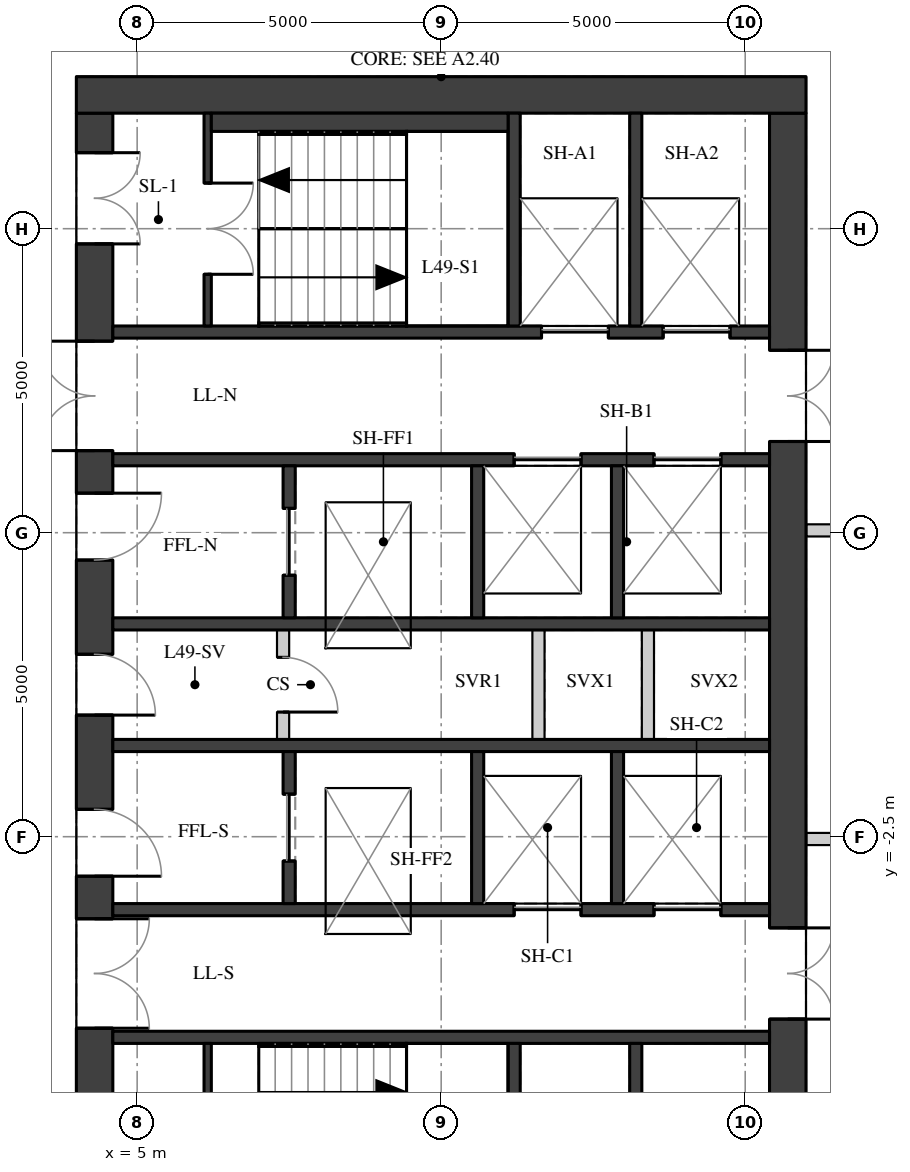
"""IFC4 building model, lengths in metres.
Left out: names, types, materials, properties, quantities, classifications, styles, units other than length and angle.
Written with IfcOpenShell. Run it as: python <this file> out.ifc"""

import sys

from ifc_helpers import new_model, si_unit, direction, frame, frame_2d, origin, place, context, subcontext, project, spatial, rectangle, extrude, element, fill, save


model = new_model("IFC4")
c1 = context("Model", 3, precision=1e-05, world=origin(), true_north=direction((0.0, 1.0)))
c2 = subcontext(c1, "Body", "Model", "MODEL_VIEW")
j1 = project(units=[si_unit("LENGTHUNIT", "METRE"), si_unit("PLANEANGLEUNIT", "RADIAN")], contexts=[c1])
p1 = place(None, origin())
s1 = spatial("IfcSite", under=j1, at=p1, CompositionType="ELEMENT")
p2 = place(p1, origin())
s2 = spatial("IfcBuilding", under=s1, at=p2, CompositionType="ELEMENT")
p3 = place(p2, frame((0.0, 0.0, 174.8)))
s3 = spatial("IfcBuildingStorey", under=s2, at=p3, CompositionType="ELEMENT", Elevation=174.8)
p4 = place(p3, frame((4.3, -9.4, 0.0), z_axis=(0.0, 0.0, 1.0), x_axis=(0.0, 1.0, 0.0)))
e1 = element("IfcWall", 1, at=p4, inside=s3, PredefinedType="SHEAR", context=c2, shape_type="SweptSolid", body=[
    extrude(rectangle(XDim=18.8, YDim=0.6, at=frame_2d((9.4, 0.0))), origin(), (0.0, 0.0, 1.0), 3.02),
])
p5 = place(p4, frame((0.65, 0.0, 0.0)))
e2 = element("IfcOpeningElement", 2, at=p5, cuts=e1, PredefinedType="OPENING", context=c2, shape_type="SweptSolid", body=[
    extrude(rectangle(XDim=1.5, YDim=2.1, at=frame_2d((0.75, 1.05))), frame((0.0, 0.31, 0.0), z_axis=(0.0, -1.0, 0.0), x_axis=(1.0, 0.0, 0.0)), (0.0, 0.0, 1.0), 0.62),
])
p6 = place(p4, frame((3.75, 0.0, 0.0)))
e3 = element("IfcOpeningElement", 3, at=p6, cuts=e1, PredefinedType="OPENING", context=c2, shape_type="SweptSolid", body=[
    extrude(rectangle(XDim=1.8, YDim=2.1, at=frame_2d((0.9, 1.05))), frame((0.0, 0.31, 0.0), z_axis=(0.0, -1.0, 0.0), x_axis=(1.0, 0.0, 0.0)), (0.0, 0.0, 1.0), 0.62),
])
p7 = place(p4, frame((6.25, 0.0, 0.0)))
e4 = element("IfcOpeningElement", 4, at=p7, cuts=e1, PredefinedType="OPENING", context=c2, shape_type="SweptSolid", body=[
    extrude(rectangle(XDim=1.1, YDim=2.1, at=frame_2d((0.55, 1.05))), frame((0.0, 0.31, 0.0), z_axis=(0.0, -1.0, 0.0), x_axis=(1.0, 0.0, 0.0)), (0.0, 0.0, 1.0), 0.62),
])
p8 = place(p4, frame((8.9, 0.0, 0.0)))
e5 = element("IfcOpeningElement", 5, at=p8, cuts=e1, PredefinedType="OPENING", context=c2, shape_type="SweptSolid", body=[
    extrude(rectangle(XDim=1.0, YDim=2.1, at=frame_2d((0.5, 1.05))), frame((0.0, 0.31, 0.0), z_axis=(0.0, -1.0, 0.0), x_axis=(1.0, 0.0, 0.0)), (0.0, 0.0, 1.0), 0.62),
])
p9 = place(p4, frame((11.45, 0.0, 0.0)))
e6 = element("IfcOpeningElement", 6, at=p9, cuts=e1, PredefinedType="OPENING", context=c2, shape_type="SweptSolid", body=[
    extrude(rectangle(XDim=1.1, YDim=2.1, at=frame_2d((0.55, 1.05))), frame((0.0, 0.31, 0.0), z_axis=(0.0, -1.0, 0.0), x_axis=(1.0, 0.0, 0.0)), (0.0, 0.0, 1.0), 0.62),
])
p10 = place(p4, frame((13.25, 0.0, 0.0)))
e7 = element("IfcOpeningElement", 7, at=p10, cuts=e1, PredefinedType="OPENING", context=c2, shape_type="SweptSolid", body=[
    extrude(rectangle(XDim=1.8, YDim=2.1, at=frame_2d((0.9, 1.05))), frame((0.0, 0.31, 0.0), z_axis=(0.0, -1.0, 0.0), x_axis=(1.0, 0.0, 0.0)), (0.0, 0.0, 1.0), 0.62),
])
p11 = place(p4, frame((16.65, 0.0, 0.0)))
e8 = element("IfcOpeningElement", 8, at=p11, cuts=e1, PredefinedType="OPENING", context=c2, shape_type="SweptSolid", body=[
    extrude(rectangle(XDim=1.5, YDim=2.1, at=frame_2d((0.75, 1.05))), frame((0.0, 0.31, 0.0), z_axis=(0.0, -1.0, 0.0), x_axis=(1.0, 0.0, 0.0)), (0.0, 0.0, 1.0), 0.62),
])
p12 = place(p3, frame((15.7, -9.4, 0.0), z_axis=(0.0, 0.0, 1.0), x_axis=(0.0, 1.0, 0.0)))
e9 = element("IfcWall", 9, at=p12, inside=s3, PredefinedType="SHEAR", context=c2, shape_type="SweptSolid", body=[
    extrude(rectangle(XDim=18.8, YDim=0.6, at=frame_2d((9.4, 0.0))), origin(), (0.0, 0.0, 1.0), 3.02),
])
p13 = place(p12, frame((13.4, 0.0, 0.0)))
e10 = element("IfcOpeningElement", 10, at=p13, cuts=e9, PredefinedType="OPENING", context=c2, shape_type="SweptSolid", body=[
    extrude(rectangle(XDim=1.5, YDim=2.1, at=frame_2d((0.75, 1.05))), frame((0.0, 0.31, 0.0), z_axis=(0.0, -1.0, 0.0), x_axis=(1.0, 0.0, 0.0)), (0.0, 0.0, 1.0), 0.62),
])
p14 = place(p12, frame((3.9, 0.0, 0.0)))
e11 = element("IfcOpeningElement", 11, at=p14, cuts=e9, PredefinedType="OPENING", context=c2, shape_type="SweptSolid", body=[
    extrude(rectangle(XDim=1.5, YDim=2.1, at=frame_2d((0.75, 1.05))), frame((0.0, 0.31, 0.0), z_axis=(0.0, -1.0, 0.0), x_axis=(1.0, 0.0, 0.0)), (0.0, 0.0, 1.0), 0.62),
])
p15 = place(p3, frame((4.0, 9.7, 0.0), z_axis=(0.0, 0.0, 1.0), x_axis=(1.0, 0.0, 0.0)))
e12 = element("IfcWall", 12, at=p15, inside=s3, PredefinedType="SHEAR", context=c2, shape_type="SweptSolid", body=[
    extrude(rectangle(XDim=12.0, YDim=0.6, at=frame_2d((6.0, 0.0))), origin(), (0.0, 0.0, 1.0), 3.02),
])
p16 = place(p3, frame((4.6, 5.8, 0.0), z_axis=(0.0, 0.0, 1.0), x_axis=(1.0, 0.0, 0.0)))
e13 = element("IfcWall", 13, at=p16, inside=s3, PredefinedType="SHEAR", context=c2, shape_type="SweptSolid", body=[
    extrude(rectangle(XDim=10.8, YDim=0.2, at=frame_2d((5.4, 0.0))), origin(), (0.0, 0.0, 1.0), 3.02),
])
p17 = place(p16, frame((7.05, 0.0, 0.0)))
e14 = element("IfcOpeningElement", 14, at=p17, cuts=e13, PredefinedType="OPENING", context=c2, shape_type="SweptSolid", body=[
    extrude(rectangle(XDim=1.1, YDim=2.1, at=frame_2d((0.55, 1.05))), frame((0.0, 0.11, 0.0), z_axis=(0.0, -1.0, 0.0), x_axis=(1.0, 0.0, 0.0)), (0.0, 0.0, 1.0), 0.22),
])
p18 = place(p16, frame((9.05, 0.0, 0.0)))
e15 = element("IfcOpeningElement", 15, at=p18, cuts=e13, PredefinedType="OPENING", context=c2, shape_type="SweptSolid", body=[
    extrude(rectangle(XDim=1.1, YDim=2.1, at=frame_2d((0.55, 1.05))), frame((0.0, 0.11, 0.0), z_axis=(0.0, -1.0, 0.0), x_axis=(1.0, 0.0, 0.0)), (0.0, 0.0, 1.0), 0.22),
])
p19 = place(p3, frame((4.6, 3.7, 0.0), z_axis=(0.0, 0.0, 1.0), x_axis=(1.0, 0.0, 0.0)))
e16 = element("IfcWall", 16, at=p19, inside=s3, PredefinedType="SHEAR", context=c2, shape_type="SweptSolid", body=[
    extrude(rectangle(XDim=10.8, YDim=0.2, at=frame_2d((5.4, 0.0))), origin(), (0.0, 0.0, 1.0), 3.02),
])
p20 = place(p19, frame((6.6, 0.0, 0.0)))
e17 = element("IfcOpeningElement", 17, at=p20, cuts=e16, PredefinedType="OPENING", context=c2, shape_type="SweptSolid", body=[
    extrude(rectangle(XDim=1.1, YDim=2.1, at=frame_2d((0.55, 1.05))), frame((0.0, 0.11, 0.0), z_axis=(0.0, -1.0, 0.0), x_axis=(1.0, 0.0, 0.0)), (0.0, 0.0, 1.0), 0.22),
])
p21 = place(p19, frame((8.9, 0.0, 0.0)))
e18 = element("IfcOpeningElement", 18, at=p21, cuts=e16, PredefinedType="OPENING", context=c2, shape_type="SweptSolid", body=[
    extrude(rectangle(XDim=1.1, YDim=2.1, at=frame_2d((0.55, 1.05))), frame((0.0, 0.11, 0.0), z_axis=(0.0, -1.0, 0.0), x_axis=(1.0, 0.0, 0.0)), (0.0, 0.0, 1.0), 0.22),
])
for number, where, z_axis, x_axis in (
    (19, (4.6, 1.0, 0.0), (0.0, 0.0, 1.0), (1.0, 0.0, 0.0)),
    (20, (4.6, -1.0, 0.0), (0.0, 0.0, 1.0), (1.0, 0.0, 0.0)),
):
    element("IfcWall", number, at=place(p3, frame(where, z_axis=z_axis, x_axis=x_axis)), inside=s3, PredefinedType="SHEAR", context=c2, shape_type="SweptSolid", body=[
        extrude(rectangle(XDim=10.8, YDim=0.2, at=frame_2d((5.4, 0.0))), origin(), (0.0, 0.0, 1.0), 3.02),
    ])
p22 = place(p3, frame((4.6, -3.7, 0.0), z_axis=(0.0, 0.0, 1.0), x_axis=(1.0, 0.0, 0.0)))
e21 = element("IfcWall", 21, at=p22, inside=s3, PredefinedType="SHEAR", context=c2, shape_type="SweptSolid", body=[
    extrude(rectangle(XDim=10.8, YDim=0.2, at=frame_2d((5.4, 0.0))), origin(), (0.0, 0.0, 1.0), 3.02),
])
p23 = place(p22, frame((6.6, 0.0, 0.0)))
e22 = element("IfcOpeningElement", 22, at=p23, cuts=e21, PredefinedType="OPENING", context=c2, shape_type="SweptSolid", body=[
    extrude(rectangle(XDim=1.1, YDim=2.1, at=frame_2d((0.55, 1.05))), frame((0.0, 0.11, 0.0), z_axis=(0.0, -1.0, 0.0), x_axis=(1.0, 0.0, 0.0)), (0.0, 0.0, 1.0), 0.22),
])
p24 = place(p22, frame((8.9, 0.0, 0.0)))
e23 = element("IfcOpeningElement", 23, at=p24, cuts=e21, PredefinedType="OPENING", context=c2, shape_type="SweptSolid", body=[
    extrude(rectangle(XDim=1.1, YDim=2.1, at=frame_2d((0.55, 1.05))), frame((0.0, 0.11, 0.0), z_axis=(0.0, -1.0, 0.0), x_axis=(1.0, 0.0, 0.0)), (0.0, 0.0, 1.0), 0.22),
])
p25 = place(p3, frame((4.6, -5.8, 0.0), z_axis=(0.0, 0.0, 1.0), x_axis=(1.0, 0.0, 0.0)))
e24 = element("IfcWall", 24, at=p25, inside=s3, PredefinedType="SHEAR", context=c2, shape_type="SweptSolid", body=[
    extrude(rectangle(XDim=10.8, YDim=0.2, at=frame_2d((5.4, 0.0))), origin(), (0.0, 0.0, 1.0), 3.02),
])
for number, where, z_axis, x_axis in (
    (25, (11.2, 5.9, 0.0), (0.0, 0.0, 1.0), (0.0, 1.0, 0.0)),
    (26, (11.2, -9.4, 0.0), (0.0, 0.0, 1.0), (0.0, 1.0, 0.0)),
    (27, (13.2, 5.9, 0.0), (0.0, 0.0, 1.0), (0.0, 1.0, 0.0)),
    (28, (13.2, -9.4, 0.0), (0.0, 0.0, 1.0), (0.0, 1.0, 0.0)),
):
    element("IfcWall", number, at=place(p3, frame(where, z_axis=z_axis, x_axis=x_axis)), inside=s3, PredefinedType="SHEAR", context=c2, shape_type="SweptSolid", body=[
        extrude(rectangle(XDim=3.5, YDim=0.2, at=frame_2d((1.75, 0.0))), origin(), (0.0, 0.0, 1.0), 3.02),
    ])
p26 = place(p3, frame((7.5, 1.1, 0.0), z_axis=(0.0, 0.0, 1.0), x_axis=(0.0, 1.0, 0.0)))
e29 = element("IfcWall", 29, at=p26, inside=s3, PredefinedType="SHEAR", context=c2, shape_type="SweptSolid", body=[
    extrude(rectangle(XDim=2.5, YDim=0.2, at=frame_2d((1.25, 0.0))), origin(), (0.0, 0.0, 1.0), 3.02),
])
p27 = place(p26, frame((0.7, 0.0, 0.0)))
e30 = element("IfcOpeningElement", 30, at=p27, cuts=e29, PredefinedType="OPENING", context=c2, shape_type="SweptSolid", body=[
    extrude(rectangle(XDim=1.1, YDim=2.1, at=frame_2d((0.55, 1.05))), frame((0.0, 0.11, 0.0), z_axis=(0.0, -1.0, 0.0), x_axis=(1.0, 0.0, 0.0)), (0.0, 0.0, 1.0), 0.22),
])
p28 = place(p3, frame((7.5, -3.6, 0.0), z_axis=(0.0, 0.0, 1.0), x_axis=(0.0, 1.0, 0.0)))
e31 = element("IfcWall", 31, at=p28, inside=s3, PredefinedType="SHEAR", context=c2, shape_type="SweptSolid", body=[
    extrude(rectangle(XDim=2.5, YDim=0.2, at=frame_2d((1.25, 0.0))), origin(), (0.0, 0.0, 1.0), 3.02),
])
p29 = place(p28, frame((0.7, 0.0, 0.0)))
e32 = element("IfcOpeningElement", 32, at=p29, cuts=e31, PredefinedType="OPENING", context=c2, shape_type="SweptSolid", body=[
    extrude(rectangle(XDim=1.1, YDim=2.1, at=frame_2d((0.55, 1.05))), frame((0.0, 0.11, 0.0), z_axis=(0.0, -1.0, 0.0), x_axis=(1.0, 0.0, 0.0)), (0.0, 0.0, 1.0), 0.22),
])
for number, where, z_axis, x_axis in (
    (33, (10.6, 1.1, 0.0), (0.0, 0.0, 1.0), (0.0, 1.0, 0.0)),
    (34, (10.6, -3.6, 0.0), (0.0, 0.0, 1.0), (0.0, 1.0, 0.0)),
    (35, (12.9, 1.1, 0.0), (0.0, 0.0, 1.0), (0.0, 1.0, 0.0)),
    (36, (12.9, -3.6, 0.0), (0.0, 0.0, 1.0), (0.0, 1.0, 0.0)),
):
    element("IfcWall", number, at=place(p3, frame(where, z_axis=z_axis, x_axis=x_axis)), inside=s3, PredefinedType="SHEAR", context=c2, shape_type="SweptSolid", body=[
        extrude(rectangle(XDim=2.5, YDim=0.2, at=frame_2d((1.25, 0.0))), origin(), (0.0, 0.0, 1.0), 3.02),
    ])
p30 = place(p3, frame((6.16, 5.9, 0.0), z_axis=(0.0, 0.0, 1.0), x_axis=(0.0, 1.0, 0.0)))
e37 = element("IfcWall", 37, at=p30, inside=s3, PredefinedType="SHEAR", context=c2, shape_type="SweptSolid", body=[
    extrude(rectangle(XDim=3.5, YDim=0.12, at=frame_2d((1.75, 0.0))), origin(), (0.0, 0.0, 1.0), 3.02),
])
p31 = place(p30, frame((0.85, 0.0, 0.0)))
e38 = element("IfcOpeningElement", 38, at=p31, cuts=e37, PredefinedType="OPENING", context=c2, shape_type="SweptSolid", body=[
    extrude(rectangle(XDim=1.5, YDim=2.1, at=frame_2d((0.75, 1.05))), frame((0.0, 0.07, 0.0), z_axis=(0.0, -1.0, 0.0), x_axis=(1.0, 0.0, 0.0)), (0.0, 0.0, 1.0), 0.14),
])
p32 = place(p3, frame((6.16, -9.4, 0.0), z_axis=(0.0, 0.0, 1.0), x_axis=(0.0, 1.0, 0.0)))
e39 = element("IfcWall", 39, at=p32, inside=s3, PredefinedType="SHEAR", context=c2, shape_type="SweptSolid", body=[
    extrude(rectangle(XDim=3.5, YDim=0.12, at=frame_2d((1.75, 0.0))), origin(), (0.0, 0.0, 1.0), 3.02),
])
p33 = place(p32, frame((1.15, 0.0, 0.0)))
e40 = element("IfcOpeningElement", 40, at=p33, cuts=e39, PredefinedType="OPENING", context=c2, shape_type="SweptSolid", body=[
    extrude(rectangle(XDim=1.5, YDim=2.1, at=frame_2d((0.75, 1.05))), frame((0.0, 0.07, 0.0), z_axis=(0.0, -1.0, 0.0), x_axis=(1.0, 0.0, 0.0)), (0.0, 0.0, 1.0), 0.14),
])
p34 = place(p3, frame((7.4, -0.9, 0.0), z_axis=(0.0, 0.0, 1.0), x_axis=(0.0, 1.0, 0.0)))
e41 = element("IfcWall", 41, at=p34, inside=s3, PredefinedType="PARTITIONING", context=c2, shape_type="SweptSolid", body=[
    extrude(rectangle(XDim=1.8, YDim=0.2, at=frame_2d((0.9, 0.0))), origin(), (0.0, 0.0, 1.0), 3.02),
])
p35 = place(p34, frame((0.45, 0.0, 0.0)))
e42 = element("IfcOpeningElement", 42, at=p35, cuts=e41, PredefinedType="OPENING", context=c2, shape_type="SweptSolid", body=[
    extrude(rectangle(XDim=0.9, YDim=2.1, at=frame_2d((0.45, 1.05))), frame((0.0, 0.11, 0.0), z_axis=(0.0, -1.0, 0.0), x_axis=(1.0, 0.0, 0.0)), (0.0, 0.0, 1.0), 0.22),
])
for number, where, z_axis, x_axis in (
    (43, (11.6, -0.9, 0.0), (0.0, 0.0, 1.0), (0.0, 1.0, 0.0)),
    (44, (13.4, -0.9, 0.0), (0.0, 0.0, 1.0), (0.0, 1.0, 0.0)),
):
    element("IfcWall", number, at=place(p3, frame(where, z_axis=z_axis, x_axis=x_axis)), inside=s3, PredefinedType="PARTITIONING", context=c2, shape_type="SweptSolid", body=[
        extrude(rectangle(XDim=1.8, YDim=0.2, at=frame_2d((0.9, 0.0))), origin(), (0.0, 0.0, 1.0), 3.02),
    ])
p36 = place(p3, frame((6.22, 9.25, 0.0), z_axis=(0.0, 0.0, 1.0), x_axis=(1.0, 0.0, 0.0)))
e45 = element("IfcWall", 45, at=p36, inside=s3, PredefinedType="PARTITIONING", context=c2, shape_type="SweptSolid", body=[
    extrude(rectangle(XDim=4.88, YDim=0.3, at=frame_2d((2.44, 0.0))), origin(), (0.0, 0.0, 1.0), 3.02),
])
p37 = place(p3, frame((17.5, 2.538, 0.0), z_axis=(0.0, 0.0, 1.0), x_axis=(-1.0, 0.0, 0.0)))
e46 = element("IfcWall", 46, at=p37, inside=s3, PredefinedType="PARTITIONING", context=c2, shape_type="SweptSolid", body=[
    extrude(rectangle(XDim=1.496, YDim=0.2, at=frame_2d((0.748, 0.0))), origin(), (0.0, 0.0, 1.0), 3.02),
])
p38 = place(p3, frame((16.004, -2.538, 0.0), z_axis=(0.0, 0.0, 1.0), x_axis=(1.0, 0.0, 0.0)))
e47 = element("IfcWall", 47, at=p38, inside=s3, PredefinedType="PARTITIONING", context=c2, shape_type="SweptSolid", body=[
    extrude(rectangle(XDim=1.596, YDim=0.2, at=frame_2d((0.798, 0.0))), origin(), (0.0, 0.0, 1.0), 3.02),
])
p39 = place(p6, origin())
e48 = element("IfcDoor", 48, at=p39, inside=s3, OperationType="DOUBLE_DOOR_SINGLE_SWING", PredefinedType="DOOR", context=c2, shape_type="SweptSolid", body=[
    extrude(rectangle(XDim=1.8, YDim=2.1, at=frame_2d((0.9, 1.05))), frame((0.0, 0.025, 0.0), z_axis=(0.0, -1.0, 0.0), x_axis=(1.0, 0.0, 0.0)), (0.0, 0.0, 1.0), 0.05),
])
fill(e3, e48)
p40 = place(p7, origin())
e49 = element("IfcDoor", 49, at=p40, inside=s3, OperationType="SINGLE_SWING_RIGHT", PredefinedType="DOOR", context=c2, shape_type="SweptSolid", body=[
    extrude(rectangle(XDim=1.1, YDim=2.1, at=frame_2d((0.55, 1.05))), frame((0.0, 0.025, 0.0), z_axis=(0.0, -1.0, 0.0), x_axis=(1.0, 0.0, 0.0)), (0.0, 0.0, 1.0), 0.05),
])
fill(e4, e49)
p41 = place(p8, origin())
e50 = element("IfcDoor", 50, at=p41, inside=s3, OperationType="SINGLE_SWING_RIGHT", PredefinedType="DOOR", context=c2, shape_type="SweptSolid", body=[
    extrude(rectangle(XDim=1.0, YDim=2.1, at=frame_2d((0.5, 1.05))), frame((0.0, 0.025, 0.0), z_axis=(0.0, -1.0, 0.0), x_axis=(1.0, 0.0, 0.0)), (0.0, 0.0, 1.0), 0.05),
])
fill(e5, e50)
p42 = place(p9, origin())
e51 = element("IfcDoor", 51, at=p42, inside=s3, OperationType="SINGLE_SWING_LEFT", PredefinedType="DOOR", context=c2, shape_type="SweptSolid", body=[
    extrude(rectangle(XDim=1.1, YDim=2.1, at=frame_2d((0.55, 1.05))), frame((0.0, 0.025, 0.0), z_axis=(0.0, -1.0, 0.0), x_axis=(1.0, 0.0, 0.0)), (0.0, 0.0, 1.0), 0.05),
])
fill(e6, e51)
p43 = place(p10, origin())
e52 = element("IfcDoor", 52, at=p43, inside=s3, OperationType="DOUBLE_DOOR_SINGLE_SWING", PredefinedType="DOOR", context=c2, shape_type="SweptSolid", body=[
    extrude(rectangle(XDim=1.8, YDim=2.1, at=frame_2d((0.9, 1.05))), frame((0.0, 0.025, 0.0), z_axis=(0.0, -1.0, 0.0), x_axis=(1.0, 0.0, 0.0)), (0.0, 0.0, 1.0), 0.05),
])
fill(e7, e52)
p44 = place(p11, origin())
e53 = element("IfcDoor", 53, at=p44, inside=s3, OperationType="DOUBLE_DOOR_SINGLE_SWING", PredefinedType="DOOR", context=c2, shape_type="SweptSolid", body=[
    extrude(rectangle(XDim=1.5, YDim=2.1, at=frame_2d((0.75, 1.05))), frame((0.0, 0.025, 0.0), z_axis=(0.0, -1.0, 0.0), x_axis=(1.0, 0.0, 0.0)), (0.0, 0.0, 1.0), 0.05),
])
fill(e8, e53)
p45 = place(p13, origin())
e54 = element("IfcDoor", 54, at=p45, inside=s3, OperationType="DOUBLE_DOOR_SINGLE_SWING", PredefinedType="DOOR", context=c2, shape_type="SweptSolid", body=[
    extrude(rectangle(XDim=1.5, YDim=2.1, at=frame_2d((0.75, 1.05))), frame((0.0, 0.025, 0.0), z_axis=(0.0, -1.0, 0.0), x_axis=(1.0, 0.0, 0.0)), (0.0, 0.0, 1.0), 0.05),
])
fill(e10, e54)
p46 = place(p14, origin())
e55 = element("IfcDoor", 55, at=p46, inside=s3, OperationType="DOUBLE_DOOR_SINGLE_SWING", PredefinedType="DOOR", context=c2, shape_type="SweptSolid", body=[
    extrude(rectangle(XDim=1.5, YDim=2.1, at=frame_2d((0.75, 1.05))), frame((0.0, 0.025, 0.0), z_axis=(0.0, -1.0, 0.0), x_axis=(1.0, 0.0, 0.0)), (0.0, 0.0, 1.0), 0.05),
])
fill(e11, e55)
p47 = place(p31, origin())
e56 = element("IfcDoor", 56, at=p47, inside=s3, OperationType="DOUBLE_DOOR_SINGLE_SWING", PredefinedType="DOOR", context=c2, shape_type="SweptSolid", body=[
    extrude(rectangle(XDim=1.5, YDim=2.1, at=frame_2d((0.75, 1.05))), frame((0.0, 0.025, 0.0), z_axis=(0.0, -1.0, 0.0), x_axis=(1.0, 0.0, 0.0)), (0.0, 0.0, 1.0), 0.05),
])
fill(e38, e56)
p48 = place(p17, origin())
e57 = element("IfcDoor", 57, at=p48, inside=s3, OperationType="DOUBLE_DOOR_SLIDING", PredefinedType="DOOR", context=c2, shape_type="SweptSolid", body=[
    extrude(rectangle(XDim=1.1, YDim=2.1, at=frame_2d((0.55, 1.05))), frame((0.0, 0.025, 0.0), z_axis=(0.0, -1.0, 0.0), x_axis=(1.0, 0.0, 0.0)), (0.0, 0.0, 1.0), 0.05),
])
fill(e14, e57)
p49 = place(p18, origin())
e58 = element("IfcDoor", 58, at=p49, inside=s3, OperationType="DOUBLE_DOOR_SLIDING", PredefinedType="DOOR", context=c2, shape_type="SweptSolid", body=[
    extrude(rectangle(XDim=1.1, YDim=2.1, at=frame_2d((0.55, 1.05))), frame((0.0, 0.025, 0.0), z_axis=(0.0, -1.0, 0.0), x_axis=(1.0, 0.0, 0.0)), (0.0, 0.0, 1.0), 0.05),
])
fill(e15, e58)
p50 = place(p20, origin())
e59 = element("IfcDoor", 59, at=p50, inside=s3, OperationType="DOUBLE_DOOR_SLIDING", PredefinedType="DOOR", context=c2, shape_type="SweptSolid", body=[
    extrude(rectangle(XDim=1.1, YDim=2.1, at=frame_2d((0.55, 1.05))), frame((0.0, 0.025, 0.0), z_axis=(0.0, -1.0, 0.0), x_axis=(1.0, 0.0, 0.0)), (0.0, 0.0, 1.0), 0.05),
])
fill(e17, e59)
p51 = place(p21, origin())
e60 = element("IfcDoor", 60, at=p51, inside=s3, OperationType="DOUBLE_DOOR_SLIDING", PredefinedType="DOOR", context=c2, shape_type="SweptSolid", body=[
    extrude(rectangle(XDim=1.1, YDim=2.1, at=frame_2d((0.55, 1.05))), frame((0.0, 0.025, 0.0), z_axis=(0.0, -1.0, 0.0), x_axis=(1.0, 0.0, 0.0)), (0.0, 0.0, 1.0), 0.05),
])
fill(e18, e60)
p52 = place(p23, origin())
e61 = element("IfcDoor", 61, at=p52, inside=s3, OperationType="DOUBLE_DOOR_SLIDING", PredefinedType="DOOR", context=c2, shape_type="SweptSolid", body=[
    extrude(rectangle(XDim=1.1, YDim=2.1, at=frame_2d((0.55, 1.05))), frame((0.0, 0.025, 0.0), z_axis=(0.0, -1.0, 0.0), x_axis=(1.0, 0.0, 0.0)), (0.0, 0.0, 1.0), 0.05),
])
fill(e22, e61)
p53 = place(p24, origin())
e62 = element("IfcDoor", 62, at=p53, inside=s3, OperationType="DOUBLE_DOOR_SLIDING", PredefinedType="DOOR", context=c2, shape_type="SweptSolid", body=[
    extrude(rectangle(XDim=1.1, YDim=2.1, at=frame_2d((0.55, 1.05))), frame((0.0, 0.025, 0.0), z_axis=(0.0, -1.0, 0.0), x_axis=(1.0, 0.0, 0.0)), (0.0, 0.0, 1.0), 0.05),
])
fill(e23, e62)
p54 = place(p27, origin())
e63 = element("IfcDoor", 63, at=p54, inside=s3, OperationType="DOUBLE_DOOR_SLIDING", PredefinedType="DOOR", context=c2, shape_type="SweptSolid", body=[
    extrude(rectangle(XDim=1.1, YDim=2.1, at=frame_2d((0.55, 1.05))), frame((0.0, 0.025, 0.0), z_axis=(0.0, -1.0, 0.0), x_axis=(1.0, 0.0, 0.0)), (0.0, 0.0, 1.0), 0.05),
])
fill(e30, e63)
p55 = place(p29, origin())
e64 = element("IfcDoor", 64, at=p55, inside=s3, OperationType="DOUBLE_DOOR_SLIDING", PredefinedType="DOOR", context=c2, shape_type="SweptSolid", body=[
    extrude(rectangle(XDim=1.1, YDim=2.1, at=frame_2d((0.55, 1.05))), frame((0.0, 0.025, 0.0), z_axis=(0.0, -1.0, 0.0), x_axis=(1.0, 0.0, 0.0)), (0.0, 0.0, 1.0), 0.05),
])
fill(e32, e64)
p56 = place(p35, origin())
e65 = element("IfcDoor", 65, at=p56, inside=s3, OperationType="SINGLE_SWING_RIGHT", PredefinedType="DOOR", context=c2, shape_type="SweptSolid", body=[
    extrude(rectangle(XDim=0.9, YDim=2.1, at=frame_2d((0.45, 1.05))), frame((0.0, 0.025, 0.0), z_axis=(0.0, -1.0, 0.0), x_axis=(1.0, 0.0, 0.0)), (0.0, 0.0, 1.0), 0.05),
])
fill(e42, e65)
save(model, sys.argv[1])
